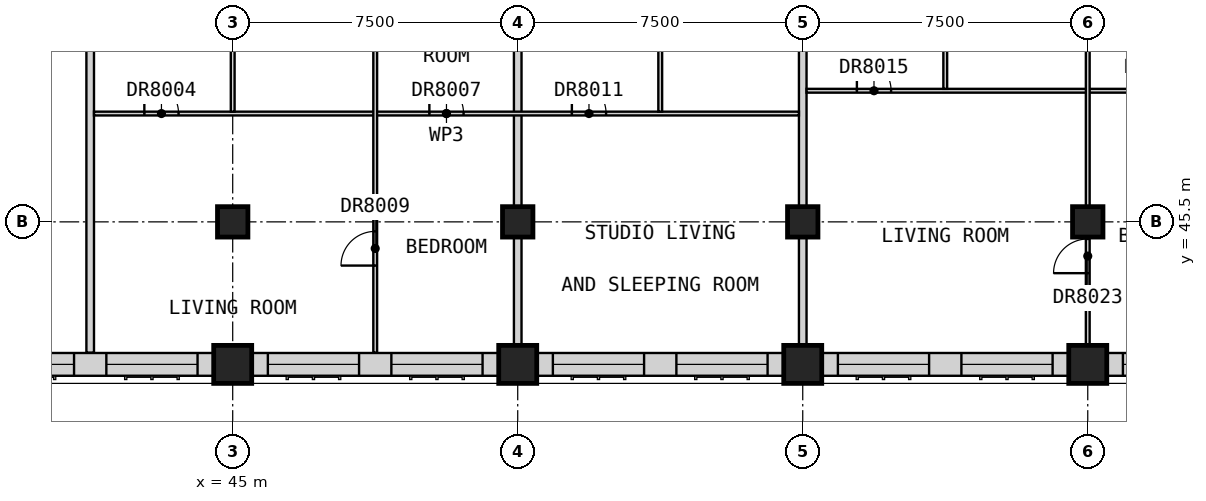
"""IFC4 building model, lengths in metres.
Left out: names, types, materials, properties, quantities, classifications, styles, units other than length and angle.
Written with IfcOpenShell. Run it as: python <this file> out.ifc"""

import sys

from ifc_helpers import new_model, si_unit, direction, frame, frame_2d, origin, origin_2d, place, context, subcontext, project, spatial, rectangle, extrude, element, fill, save


model = new_model("IFC4")
c1 = context("Model", 3, precision=1e-05, world=origin(), true_north=direction((0.0, 1.0)))
c2 = subcontext(c1, "Body", "Model", "MODEL_VIEW")
j1 = project(units=[si_unit("LENGTHUNIT", "METRE"), si_unit("PLANEANGLEUNIT", "RADIAN")], contexts=[c1])
p1 = place(None, origin())
s1 = spatial("IfcSite", under=j1, at=p1, CompositionType="ELEMENT")
p2 = place(p1, origin())
s2 = spatial("IfcBuilding", under=s1, at=p2, CompositionType="ELEMENT")
p3 = place(p2, frame((0.0, 0.0, 233.7)))
s3 = spatial("IfcBuildingStorey", under=s2, at=p3, CompositionType="ELEMENT", Elevation=233.7)
for number, where, z_axis, x_axis in (
    (1, (45.0, 41.75, 0.0), (0.0, 0.0, 1.0), (1.0, 0.0, 0.0)),
    (2, (52.5, 41.75, 0.0), (0.0, 0.0, 1.0), (1.0, 0.0, 0.0)),
    (3, (60.0, 41.75, 0.0), (0.0, 0.0, 1.0), (1.0, 0.0, 0.0)),
    (4, (67.5, 41.75, 0.0), (0.0, 0.0, 1.0), (1.0, 0.0, 0.0)),
):
    element("IfcColumn", number, at=place(p3, frame(where, z_axis=z_axis, x_axis=x_axis)), inside=s3, PredefinedType="COLUMN", context=c2, shape_type="SweptSolid", body=[
        extrude(rectangle(XDim=1.0, YDim=1.0, at=origin_2d()), origin(), (0.0, 0.0, 1.0), 3.5),
    ])
for number, where, z_axis, x_axis in (
    (5, (45.0, 45.5, 0.0), (0.0, 0.0, 1.0), (1.0, 0.0, 0.0)),
    (6, (52.5, 45.5, 0.0), (0.0, 0.0, 1.0), (1.0, 0.0, 0.0)),
    (7, (60.0, 45.5, 0.0), (0.0, 0.0, 1.0), (1.0, 0.0, 0.0)),
    (8, (67.5, 45.5, 0.0), (0.0, 0.0, 1.0), (1.0, 0.0, 0.0)),
):
    element("IfcColumn", number, at=place(p3, frame(where, z_axis=z_axis, x_axis=x_axis)), inside=s3, PredefinedType="COLUMN", context=c2, shape_type="SweptSolid", body=[
        extrude(rectangle(XDim=0.8, YDim=0.8, at=origin_2d()), origin(), (0.0, 0.0, 1.0), 3.5),
    ])
p4 = place(p3, frame((38.0, 41.75, 0.0), z_axis=(0.0, 0.0, 1.0), x_axis=(1.0, 0.0, 0.0)))
e9 = element("IfcWall", 9, at=p4, inside=s3, PredefinedType="SOLIDWALL", context=c2, shape_type="SweptSolid", body=[
    extrude(rectangle(XDim=6.5, YDim=0.6, at=frame_2d((3.25, 0.0))), origin(), (0.0, 0.0, 1.0), 2.75),
])
p5 = place(p4, frame((0.425, 0.0, 0.8)))
e10 = element("IfcOpeningElement", 10, at=p5, cuts=e9, PredefinedType="OPENING", context=c2, shape_type="SweptSolid", body=[
    extrude(rectangle(XDim=2.4, YDim=1.8, at=frame_2d((1.2, 0.9))), frame((0.0, 0.31, 0.0), z_axis=(0.0, -1.0, 0.0), x_axis=(1.0, 0.0, 0.0)), (0.0, 0.0, 1.0), 0.62),
])
p6 = place(p4, frame((3.675, 0.0, 0.8)))
e11 = element("IfcOpeningElement", 11, at=p6, cuts=e9, PredefinedType="OPENING", context=c2, shape_type="SweptSolid", body=[
    extrude(rectangle(XDim=2.4, YDim=1.8, at=frame_2d((1.2, 0.9))), frame((0.0, 0.31, 0.0), z_axis=(0.0, -1.0, 0.0), x_axis=(1.0, 0.0, 0.0)), (0.0, 0.0, 1.0), 0.62),
])
p7 = place(p3, frame((45.5, 41.75, 0.0), z_axis=(0.0, 0.0, 1.0), x_axis=(1.0, 0.0, 0.0)))
e12 = element("IfcWall", 12, at=p7, inside=s3, PredefinedType="SOLIDWALL", context=c2, shape_type="SweptSolid", body=[
    extrude(rectangle(XDim=6.5, YDim=0.6, at=frame_2d((3.25, 0.0))), origin(), (0.0, 0.0, 1.0), 2.75),
])
p8 = place(p7, frame((0.425, 0.0, 0.8)))
e13 = element("IfcOpeningElement", 13, at=p8, cuts=e12, PredefinedType="OPENING", context=c2, shape_type="SweptSolid", body=[
    extrude(rectangle(XDim=2.4, YDim=1.8, at=frame_2d((1.2, 0.9))), frame((0.0, 0.31, 0.0), z_axis=(0.0, -1.0, 0.0), x_axis=(1.0, 0.0, 0.0)), (0.0, 0.0, 1.0), 0.62),
])
p9 = place(p7, frame((3.675, 0.0, 0.8)))
e14 = element("IfcOpeningElement", 14, at=p9, cuts=e12, PredefinedType="OPENING", context=c2, shape_type="SweptSolid", body=[
    extrude(rectangle(XDim=2.4, YDim=1.8, at=frame_2d((1.2, 0.9))), frame((0.0, 0.31, 0.0), z_axis=(0.0, -1.0, 0.0), x_axis=(1.0, 0.0, 0.0)), (0.0, 0.0, 1.0), 0.62),
])
p10 = place(p3, frame((53.0, 41.75, 0.0), z_axis=(0.0, 0.0, 1.0), x_axis=(1.0, 0.0, 0.0)))
e15 = element("IfcWall", 15, at=p10, inside=s3, PredefinedType="SOLIDWALL", context=c2, shape_type="SweptSolid", body=[
    extrude(rectangle(XDim=6.5, YDim=0.6, at=frame_2d((3.25, 0.0))), origin(), (0.0, 0.0, 1.0), 2.75),
])
p11 = place(p10, frame((0.425, 0.0, 0.8)))
e16 = element("IfcOpeningElement", 16, at=p11, cuts=e15, PredefinedType="OPENING", context=c2, shape_type="SweptSolid", body=[
    extrude(rectangle(XDim=2.4, YDim=1.8, at=frame_2d((1.2, 0.9))), frame((0.0, 0.31, 0.0), z_axis=(0.0, -1.0, 0.0), x_axis=(1.0, 0.0, 0.0)), (0.0, 0.0, 1.0), 0.62),
])
p12 = place(p10, frame((3.675, 0.0, 0.8)))
e17 = element("IfcOpeningElement", 17, at=p12, cuts=e15, PredefinedType="OPENING", context=c2, shape_type="SweptSolid", body=[
    extrude(rectangle(XDim=2.4, YDim=1.8, at=frame_2d((1.2, 0.9))), frame((0.0, 0.31, 0.0), z_axis=(0.0, -1.0, 0.0), x_axis=(1.0, 0.0, 0.0)), (0.0, 0.0, 1.0), 0.62),
])
p13 = place(p3, frame((60.5, 41.75, 0.0), z_axis=(0.0, 0.0, 1.0), x_axis=(1.0, 0.0, 0.0)))
e18 = element("IfcWall", 18, at=p13, inside=s3, PredefinedType="SOLIDWALL", context=c2, shape_type="SweptSolid", body=[
    extrude(rectangle(XDim=6.5, YDim=0.6, at=frame_2d((3.25, 0.0))), origin(), (0.0, 0.0, 1.0), 2.75),
])
p14 = place(p13, frame((0.425, 0.0, 0.8)))
e19 = element("IfcOpeningElement", 19, at=p14, cuts=e18, PredefinedType="OPENING", context=c2, shape_type="SweptSolid", body=[
    extrude(rectangle(XDim=2.4, YDim=1.8, at=frame_2d((1.2, 0.9))), frame((0.0, 0.31, 0.0), z_axis=(0.0, -1.0, 0.0), x_axis=(1.0, 0.0, 0.0)), (0.0, 0.0, 1.0), 0.62),
])
p15 = place(p13, frame((3.675, 0.0, 0.8)))
e20 = element("IfcOpeningElement", 20, at=p15, cuts=e18, PredefinedType="OPENING", context=c2, shape_type="SweptSolid", body=[
    extrude(rectangle(XDim=2.4, YDim=1.8, at=frame_2d((1.2, 0.9))), frame((0.0, 0.31, 0.0), z_axis=(0.0, -1.0, 0.0), x_axis=(1.0, 0.0, 0.0)), (0.0, 0.0, 1.0), 0.62),
])
p16 = place(p3, frame((68.0, 41.75, 0.0), z_axis=(0.0, 0.0, 1.0), x_axis=(1.0, 0.0, 0.0)))
e21 = element("IfcWall", 21, at=p16, inside=s3, PredefinedType="SOLIDWALL", context=c2, shape_type="SweptSolid", body=[
    extrude(rectangle(XDim=5.75, YDim=0.6, at=frame_2d((2.875, 0.0))), origin(), (0.0, 0.0, 1.0), 2.75),
])
p17 = place(p16, frame((0.425, 0.0, 0.8)))
e22 = element("IfcOpeningElement", 22, at=p17, cuts=e21, PredefinedType="OPENING", context=c2, shape_type="SweptSolid", body=[
    extrude(rectangle(XDim=2.4, YDim=1.8, at=frame_2d((1.2, 0.9))), frame((0.0, 0.31, 0.0), z_axis=(0.0, -1.0, 0.0), x_axis=(1.0, 0.0, 0.0)), (0.0, 0.0, 1.0), 0.62),
])
p18 = place(p3, frame((41.25, 42.06, 0.0), z_axis=(0.0, 0.0, 1.0), x_axis=(0.0, 1.0, 0.0)))
e23 = element("IfcWall", 23, at=p18, inside=s3, PredefinedType="PARTITIONING", context=c2, shape_type="SweptSolid", body=[
    extrude(rectangle(XDim=16.065, YDim=0.2, at=frame_2d((8.032, 0.0))), origin(), (0.0, 0.0, 1.0), 3.25),
])
for number, where, z_axis, x_axis in (
    (24, (52.5, 41.25, 0.0), (0.0, 0.0, 1.0), (0.0, 1.0, 0.0)),
    (25, (60.0, 41.25, 0.0), (0.0, 0.0, 1.0), (0.0, 1.0, 0.0)),
):
    element("IfcWall", number, at=place(p3, frame(where, z_axis=z_axis, x_axis=x_axis)), inside=s3, PredefinedType="PARTITIONING", context=c2, shape_type="SweptSolid", body=[
        extrude(rectangle(XDim=16.875, YDim=0.2, at=frame_2d((8.438, 0.0))), origin(), (0.0, 0.0, 1.0), 3.25),
    ])
p19 = place(p3, frame((41.35, 48.35, 0.0), z_axis=(0.0, 0.0, 1.0), x_axis=(1.0, 0.0, 0.0)))
e26 = element("IfcWall", 26, at=p19, inside=s3, PredefinedType="PARTITIONING", context=c2, shape_type="SweptSolid", body=[
    extrude(rectangle(XDim=18.55, YDim=0.1, at=frame_2d((9.275, 0.0))), origin(), (0.0, 0.0, 1.0), 3.25),
])
p20 = place(p19, frame((1.325, 0.0, 0.0)))
e27 = element("IfcOpeningElement", 27, at=p20, cuts=e26, PredefinedType="OPENING", context=c2, shape_type="SweptSolid", body=[
    extrude(rectangle(XDim=0.9, YDim=2.1, at=frame_2d((0.45, 1.05))), frame((0.0, 0.06, 0.0), z_axis=(0.0, -1.0, 0.0), x_axis=(1.0, 0.0, 0.0)), (0.0, 0.0, 1.0), 0.12),
])
p21 = place(p19, frame((8.825, 0.0, 0.0)))
e28 = element("IfcOpeningElement", 28, at=p21, cuts=e26, PredefinedType="OPENING", context=c2, shape_type="SweptSolid", body=[
    extrude(rectangle(XDim=0.9, YDim=2.1, at=frame_2d((0.45, 1.05))), frame((0.0, 0.06, 0.0), z_axis=(0.0, -1.0, 0.0), x_axis=(1.0, 0.0, 0.0)), (0.0, 0.0, 1.0), 0.12),
])
p22 = place(p19, frame((12.575, 0.0, 0.0)))
e29 = element("IfcOpeningElement", 29, at=p22, cuts=e26, PredefinedType="OPENING", context=c2, shape_type="SweptSolid", body=[
    extrude(rectangle(XDim=0.9, YDim=2.1, at=frame_2d((0.45, 1.05))), frame((0.0, 0.06, 0.0), z_axis=(0.0, -1.0, 0.0), x_axis=(1.0, 0.0, 0.0)), (0.0, 0.0, 1.0), 0.12),
])
p23 = place(p3, frame((60.1, 48.95, 0.0), z_axis=(0.0, 0.0, 1.0), x_axis=(1.0, 0.0, 0.0)))
e30 = element("IfcWall", 30, at=p23, inside=s3, PredefinedType="PARTITIONING", context=c2, shape_type="SweptSolid", body=[
    extrude(rectangle(XDim=17.84, YDim=0.1, at=frame_2d((8.92, 0.0))), origin(), (0.0, 0.0, 1.0), 3.25),
])
p24 = place(p23, frame((1.325, 0.0, 0.0)))
e31 = element("IfcOpeningElement", 31, at=p24, cuts=e30, PredefinedType="OPENING", context=c2, shape_type="SweptSolid", body=[
    extrude(rectangle(XDim=0.9, YDim=2.1, at=frame_2d((0.45, 1.05))), frame((0.0, 0.06, 0.0), z_axis=(0.0, -1.0, 0.0), x_axis=(1.0, 0.0, 0.0)), (0.0, 0.0, 1.0), 0.12),
])
p25 = place(p23, frame((8.825, 0.0, 0.0)))
e32 = element("IfcOpeningElement", 32, at=p25, cuts=e30, PredefinedType="OPENING", context=c2, shape_type="SweptSolid", body=[
    extrude(rectangle(XDim=0.9, YDim=2.1, at=frame_2d((0.45, 1.05))), frame((0.0, 0.06, 0.0), z_axis=(0.0, -1.0, 0.0), x_axis=(1.0, 0.0, 0.0)), (0.0, 0.0, 1.0), 0.12),
])
p26 = place(p23, frame((13.725, 0.0, 0.0)))
e33 = element("IfcOpeningElement", 33, at=p26, cuts=e30, PredefinedType="OPENING", context=c2, shape_type="SweptSolid", body=[
    extrude(rectangle(XDim=0.9, YDim=2.1, at=frame_2d((0.45, 1.05))), frame((0.0, 0.06, 0.0), z_axis=(0.0, -1.0, 0.0), x_axis=(1.0, 0.0, 0.0)), (0.0, 0.0, 1.0), 0.12),
])
p27 = place(p23, frame((16.325, 0.0, 0.0)))
e34 = element("IfcOpeningElement", 34, at=p27, cuts=e30, PredefinedType="OPENING", context=c2, shape_type="SweptSolid", body=[
    extrude(rectangle(XDim=0.9, YDim=2.1, at=frame_2d((0.45, 1.05))), frame((0.0, 0.06, 0.0), z_axis=(0.0, -1.0, 0.0), x_axis=(1.0, 0.0, 0.0)), (0.0, 0.0, 1.0), 0.12),
])
p28 = place(p3, frame((45.0, 48.4, 0.0), z_axis=(0.0, 0.0, 1.0), x_axis=(0.0, 1.0, 0.0)))
e35 = element("IfcWall", 35, at=p28, inside=s3, PredefinedType="PARTITIONING", context=c2, shape_type="SweptSolid", body=[
    extrude(rectangle(XDim=4.812, YDim=0.1, at=frame_2d((2.406, 0.0))), origin(), (0.0, 0.0, 1.0), 3.25),
])
p29 = place(p28, frame((1.962, 0.0, 0.0)))
e36 = element("IfcOpeningElement", 36, at=p29, cuts=e35, PredefinedType="OPENING", context=c2, shape_type="SweptSolid", body=[
    extrude(rectangle(XDim=0.9, YDim=2.1, at=frame_2d((0.45, 1.05))), frame((0.0, 0.06, 0.0), z_axis=(0.0, -1.0, 0.0), x_axis=(1.0, 0.0, 0.0)), (0.0, 0.0, 1.0), 0.12),
])
p30 = place(p3, frame((48.75, 42.06, 0.0), z_axis=(0.0, 0.0, 1.0), x_axis=(0.0, 1.0, 0.0)))
e37 = element("IfcWall", 37, at=p30, inside=s3, PredefinedType="PARTITIONING", context=c2, shape_type="SweptSolid", body=[
    extrude(rectangle(XDim=11.152, YDim=0.1, at=frame_2d((5.576, 0.0))), origin(), (0.0, 0.0, 1.0), 3.25),
])
p31 = place(p30, frame((2.29, 0.0, 0.0)))
e38 = element("IfcOpeningElement", 38, at=p31, cuts=e37, PredefinedType="OPENING", context=c2, shape_type="SweptSolid", body=[
    extrude(rectangle(XDim=0.9, YDim=2.1, at=frame_2d((0.45, 1.05))), frame((0.0, 0.06, 0.0), z_axis=(0.0, -1.0, 0.0), x_axis=(1.0, 0.0, 0.0)), (0.0, 0.0, 1.0), 0.12),
])
p32 = place(p3, frame((56.25, 48.4, 0.0), z_axis=(0.0, 0.0, 1.0), x_axis=(0.0, 1.0, 0.0)))
e39 = element("IfcWall", 39, at=p32, inside=s3, PredefinedType="PARTITIONING", context=c2, shape_type="SweptSolid", body=[
    extrude(rectangle(XDim=4.812, YDim=0.1, at=frame_2d((2.406, 0.0))), origin(), (0.0, 0.0, 1.0), 3.25),
])
p33 = place(p32, frame((1.962, 0.0, 0.0)))
e40 = element("IfcOpeningElement", 40, at=p33, cuts=e39, PredefinedType="OPENING", context=c2, shape_type="SweptSolid", body=[
    extrude(rectangle(XDim=0.9, YDim=2.1, at=frame_2d((0.45, 1.05))), frame((0.0, 0.06, 0.0), z_axis=(0.0, -1.0, 0.0), x_axis=(1.0, 0.0, 0.0)), (0.0, 0.0, 1.0), 0.12),
])
p34 = place(p3, frame((63.75, 49.0, 0.0), z_axis=(0.0, 0.0, 1.0), x_axis=(0.0, 1.0, 0.0)))
e41 = element("IfcWall", 41, at=p34, inside=s3, PredefinedType="PARTITIONING", context=c2, shape_type="SweptSolid", body=[
    extrude(rectangle(XDim=5.413, YDim=0.1, at=frame_2d((2.706, 0.0))), origin(), (0.0, 0.0, 1.0), 3.25),
])
p35 = place(p34, frame((2.262, 0.0, 0.0)))
e42 = element("IfcOpeningElement", 42, at=p35, cuts=e41, PredefinedType="OPENING", context=c2, shape_type="SweptSolid", body=[
    extrude(rectangle(XDim=0.9, YDim=2.1, at=frame_2d((0.45, 1.05))), frame((0.0, 0.06, 0.0), z_axis=(0.0, -1.0, 0.0), x_axis=(1.0, 0.0, 0.0)), (0.0, 0.0, 1.0), 0.12),
])
p36 = place(p3, frame((67.5, 41.25, 0.0), z_axis=(0.0, 0.0, 1.0), x_axis=(0.0, 1.0, 0.0)))
e43 = element("IfcWall", 43, at=p36, inside=s3, PredefinedType="PARTITIONING", context=c2, shape_type="SweptSolid", body=[
    extrude(rectangle(XDim=13.163, YDim=0.1, at=frame_2d((6.581, 0.0))), origin(), (0.0, 0.0, 1.0), 3.25),
])
p37 = place(p36, frame((2.9, 0.0, 0.0)))
e44 = element("IfcOpeningElement", 44, at=p37, cuts=e43, PredefinedType="OPENING", context=c2, shape_type="SweptSolid", body=[
    extrude(rectangle(XDim=0.9, YDim=2.1, at=frame_2d((0.45, 1.05))), frame((0.0, 0.06, 0.0), z_axis=(0.0, -1.0, 0.0), x_axis=(1.0, 0.0, 0.0)), (0.0, 0.0, 1.0), 0.12),
])
p38 = place(p5, origin())
e45 = element("IfcWindow", 45, at=p38, inside=s3, PartitioningType="SINGLE_PANEL", PredefinedType="WINDOW", context=c2, shape_type="SweptSolid", body=[
    extrude(rectangle(XDim=2.4, YDim=1.8, at=frame_2d((1.2, 0.9))), frame((0.0, -0.07, 0.0), z_axis=(0.0, -1.0, 0.0), x_axis=(1.0, 0.0, 0.0)), (0.0, 0.0, 1.0), 0.06),
])
fill(e10, e45)
p39 = place(p6, origin())
e46 = element("IfcWindow", 46, at=p39, inside=s3, PartitioningType="SINGLE_PANEL", PredefinedType="WINDOW", context=c2, shape_type="SweptSolid", body=[
    extrude(rectangle(XDim=2.4, YDim=1.8, at=frame_2d((1.2, 0.9))), frame((0.0, -0.07, 0.0), z_axis=(0.0, -1.0, 0.0), x_axis=(1.0, 0.0, 0.0)), (0.0, 0.0, 1.0), 0.06),
])
fill(e11, e46)
p40 = place(p8, origin())
e47 = element("IfcWindow", 47, at=p40, inside=s3, PartitioningType="SINGLE_PANEL", PredefinedType="WINDOW", context=c2, shape_type="SweptSolid", body=[
    extrude(rectangle(XDim=2.4, YDim=1.8, at=frame_2d((1.2, 0.9))), frame((0.0, -0.07, 0.0), z_axis=(0.0, -1.0, 0.0), x_axis=(1.0, 0.0, 0.0)), (0.0, 0.0, 1.0), 0.06),
])
fill(e13, e47)
p41 = place(p9, origin())
e48 = element("IfcWindow", 48, at=p41, inside=s3, PartitioningType="SINGLE_PANEL", PredefinedType="WINDOW", context=c2, shape_type="SweptSolid", body=[
    extrude(rectangle(XDim=2.4, YDim=1.8, at=frame_2d((1.2, 0.9))), frame((0.0, -0.07, 0.0), z_axis=(0.0, -1.0, 0.0), x_axis=(1.0, 0.0, 0.0)), (0.0, 0.0, 1.0), 0.06),
])
fill(e14, e48)
p42 = place(p11, origin())
e49 = element("IfcWindow", 49, at=p42, inside=s3, PartitioningType="SINGLE_PANEL", PredefinedType="WINDOW", context=c2, shape_type="SweptSolid", body=[
    extrude(rectangle(XDim=2.4, YDim=1.8, at=frame_2d((1.2, 0.9))), frame((0.0, -0.07, 0.0), z_axis=(0.0, -1.0, 0.0), x_axis=(1.0, 0.0, 0.0)), (0.0, 0.0, 1.0), 0.06),
])
fill(e16, e49)
p43 = place(p12, origin())
e50 = element("IfcWindow", 50, at=p43, inside=s3, PartitioningType="SINGLE_PANEL", PredefinedType="WINDOW", context=c2, shape_type="SweptSolid", body=[
    extrude(rectangle(XDim=2.4, YDim=1.8, at=frame_2d((1.2, 0.9))), frame((0.0, -0.07, 0.0), z_axis=(0.0, -1.0, 0.0), x_axis=(1.0, 0.0, 0.0)), (0.0, 0.0, 1.0), 0.06),
])
fill(e17, e50)
p44 = place(p14, origin())
e51 = element("IfcWindow", 51, at=p44, inside=s3, PartitioningType="SINGLE_PANEL", PredefinedType="WINDOW", context=c2, shape_type="SweptSolid", body=[
    extrude(rectangle(XDim=2.4, YDim=1.8, at=frame_2d((1.2, 0.9))), frame((0.0, -0.07, 0.0), z_axis=(0.0, -1.0, 0.0), x_axis=(1.0, 0.0, 0.0)), (0.0, 0.0, 1.0), 0.06),
])
fill(e19, e51)
p45 = place(p15, origin())
e52 = element("IfcWindow", 52, at=p45, inside=s3, PartitioningType="SINGLE_PANEL", PredefinedType="WINDOW", context=c2, shape_type="SweptSolid", body=[
    extrude(rectangle(XDim=2.4, YDim=1.8, at=frame_2d((1.2, 0.9))), frame((0.0, -0.07, 0.0), z_axis=(0.0, -1.0, 0.0), x_axis=(1.0, 0.0, 0.0)), (0.0, 0.0, 1.0), 0.06),
])
fill(e20, e52)
p46 = place(p17, origin())
e53 = element("IfcWindow", 53, at=p46, inside=s3, PartitioningType="SINGLE_PANEL", PredefinedType="WINDOW", context=c2, shape_type="SweptSolid", body=[
    extrude(rectangle(XDim=2.4, YDim=1.8, at=frame_2d((1.2, 0.9))), frame((0.0, -0.07, 0.0), z_axis=(0.0, -1.0, 0.0), x_axis=(1.0, 0.0, 0.0)), (0.0, 0.0, 1.0), 0.06),
])
fill(e22, e53)
p47 = place(p20, origin())
e54 = element("IfcDoor", 54, at=p47, inside=s3, OperationType="SINGLE_SWING_LEFT", PredefinedType="DOOR", context=c2, shape_type="SweptSolid", body=[
    extrude(rectangle(XDim=0.9, YDim=2.1, at=frame_2d((0.45, 1.05))), frame((0.0, 0.025, 0.0), z_axis=(0.0, -1.0, 0.0), x_axis=(1.0, 0.0, 0.0)), (0.0, 0.0, 1.0), 0.05),
])
fill(e27, e54)
p48 = place(p21, origin())
e55 = element("IfcDoor", 55, at=p48, inside=s3, OperationType="SINGLE_SWING_LEFT", PredefinedType="DOOR", context=c2, shape_type="SweptSolid", body=[
    extrude(rectangle(XDim=0.9, YDim=2.1, at=frame_2d((0.45, 1.05))), frame((0.0, 0.025, 0.0), z_axis=(0.0, -1.0, 0.0), x_axis=(1.0, 0.0, 0.0)), (0.0, 0.0, 1.0), 0.05),
])
fill(e28, e55)
p49 = place(p31, origin())
e56 = element("IfcDoor", 56, at=p49, inside=s3, OperationType="SINGLE_SWING_LEFT", PredefinedType="DOOR", context=c2, shape_type="SweptSolid", body=[
    extrude(rectangle(XDim=0.9, YDim=2.1, at=frame_2d((0.45, 1.05))), frame((0.0, 0.025, 0.0), z_axis=(0.0, -1.0, 0.0), x_axis=(1.0, 0.0, 0.0)), (0.0, 0.0, 1.0), 0.05),
])
fill(e38, e56)
p50 = place(p22, origin())
e57 = element("IfcDoor", 57, at=p50, inside=s3, OperationType="SINGLE_SWING_LEFT", PredefinedType="DOOR", context=c2, shape_type="SweptSolid", body=[
    extrude(rectangle(XDim=0.9, YDim=2.1, at=frame_2d((0.45, 1.05))), frame((0.0, 0.025, 0.0), z_axis=(0.0, -1.0, 0.0), x_axis=(1.0, 0.0, 0.0)), (0.0, 0.0, 1.0), 0.05),
])
fill(e29, e57)
p51 = place(p24, origin())
e58 = element("IfcDoor", 58, at=p51, inside=s3, OperationType="SINGLE_SWING_LEFT", PredefinedType="DOOR", context=c2, shape_type="SweptSolid", body=[
    extrude(rectangle(XDim=0.9, YDim=2.1, at=frame_2d((0.45, 1.05))), frame((0.0, 0.025, 0.0), z_axis=(0.0, -1.0, 0.0), x_axis=(1.0, 0.0, 0.0)), (0.0, 0.0, 1.0), 0.05),
])
fill(e31, e58)
p52 = place(p37, origin())
e59 = element("IfcDoor", 59, at=p52, inside=s3, OperationType="SINGLE_SWING_LEFT", PredefinedType="DOOR", context=c2, shape_type="SweptSolid", body=[
    extrude(rectangle(XDim=0.9, YDim=2.1, at=frame_2d((0.45, 1.05))), frame((0.0, 0.025, 0.0), z_axis=(0.0, -1.0, 0.0), x_axis=(1.0, 0.0, 0.0)), (0.0, 0.0, 1.0), 0.05),
])
fill(e44, e59)
save(model, sys.argv[1])
